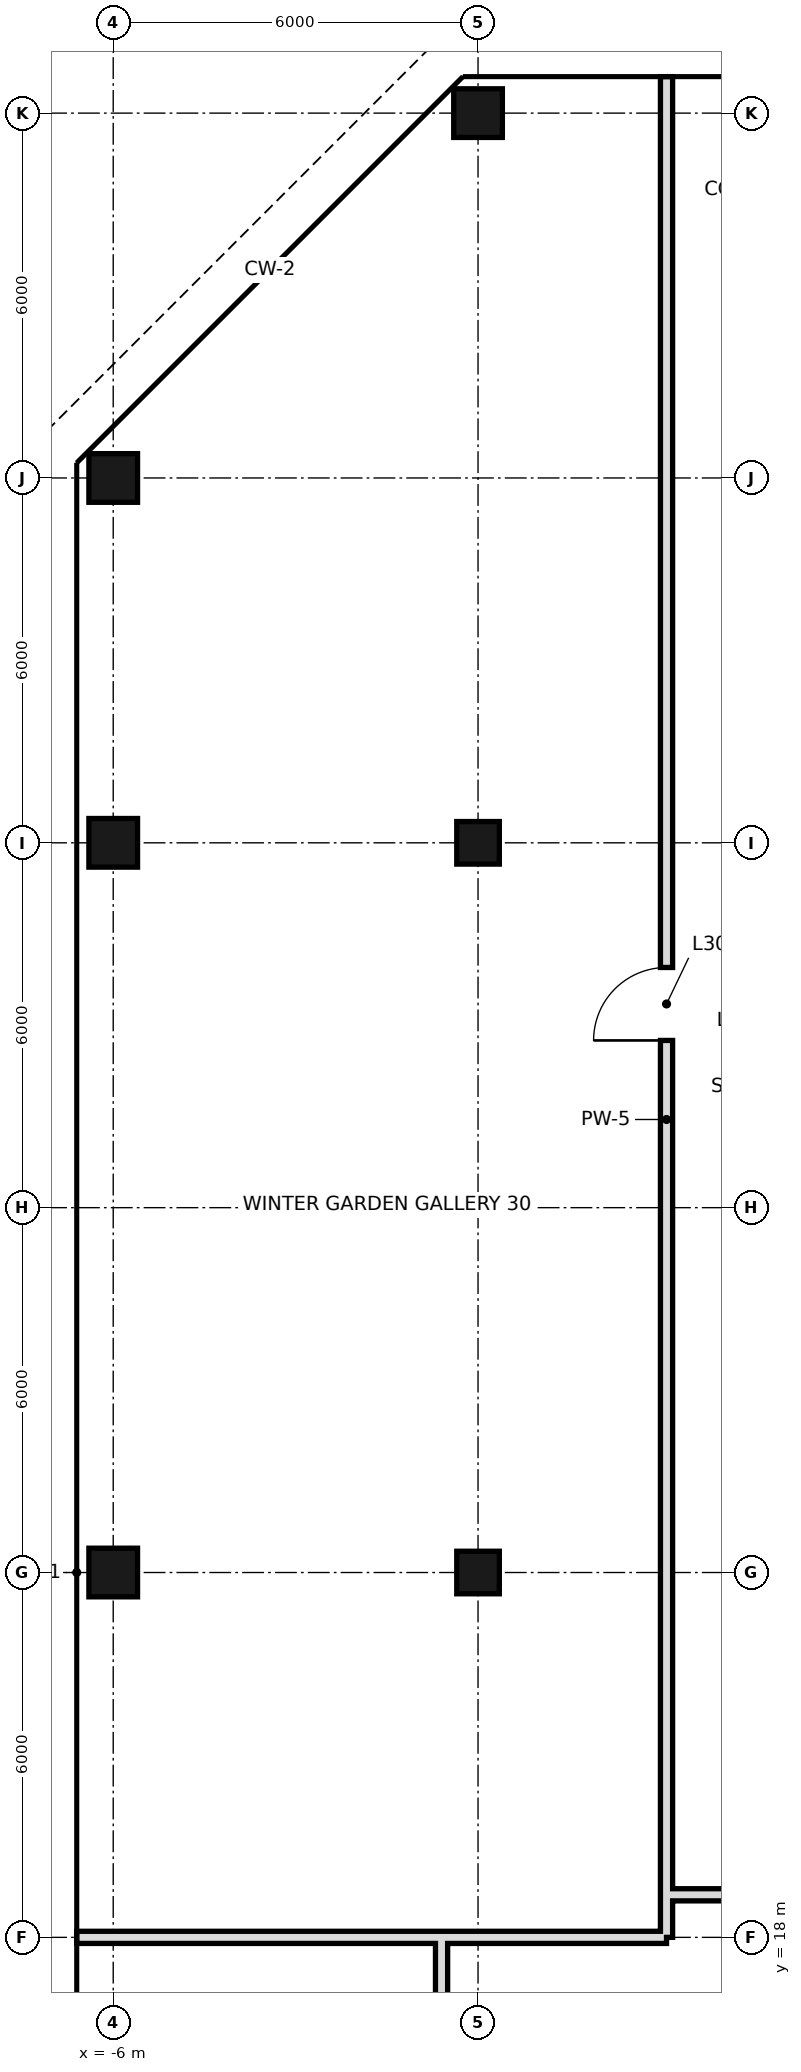
"""IFC4 building model, lengths in metres.
Left out: names, types, materials, properties, quantities, classifications, styles, units other than length and angle.
Written with IfcOpenShell. Run it as: python <this file> out.ifc"""

import sys

from ifc_helpers import new_model, si_unit, direction, frame, frame_2d, origin, origin_2d, place, context, subcontext, project, spatial, rectangle, hollow_rectangle, extrude, element, fill, save


model = new_model("IFC4")
c1 = context("Model", 3, precision=1e-05, world=origin(), true_north=direction((0.0, 1.0)))
c2 = subcontext(c1, "Body", "Model", "MODEL_VIEW")
j1 = project(units=[si_unit("LENGTHUNIT", "METRE"), si_unit("PLANEANGLEUNIT", "RADIAN")], contexts=[c1])
p1 = place(None, origin())
s1 = spatial("IfcSite", under=j1, at=p1, CompositionType="ELEMENT")
p2 = place(p1, origin())
s2 = spatial("IfcBuilding", under=s1, at=p2, CompositionType="ELEMENT")
p3 = place(p2, frame((0.0, 0.0, 134.0)))
s3 = spatial("IfcBuildingStorey", under=s2, at=p3, CompositionType="ELEMENT", Elevation=134.0)
for number, where, z_axis, x_axis in (
    (1, (-6.0, 24.0, 0.0), (0.0, 0.0, 1.0), (1.0, 0.0, 0.0)),
    (2, (-6.0, 36.0, 0.0), (0.0, 0.0, 1.0), (1.0, 0.0, 0.0)),
    (3, (-6.0, 42.0, 0.0), (0.0, 0.0, 1.0), (1.0, 0.0, 0.0)),
):
    element("IfcColumn", number, at=place(p3, frame(where, z_axis=z_axis, x_axis=x_axis)), inside=s3, PredefinedType="COLUMN", context=c2, shape_type="SweptSolid", body=[
        extrude(hollow_rectangle(XDim=0.8, YDim=0.8, WallThickness=0.04, at=origin_2d()), origin(), (0.0, 0.0, 1.0), 4.4),
    ])
for number, where, z_axis, x_axis in (
    (4, (0.0, 24.0, 0.0), (0.0, 0.0, 1.0), (1.0, 0.0, 0.0)),
    (5, (0.0, 36.0, 0.0), (0.0, 0.0, 1.0), (1.0, 0.0, 0.0)),
):
    element("IfcColumn", number, at=place(p3, frame(where, z_axis=z_axis, x_axis=x_axis)), inside=s3, PredefinedType="COLUMN", context=c2, shape_type="SweptSolid", body=[
        extrude(hollow_rectangle(XDim=0.7, YDim=0.7, WallThickness=0.036, at=origin_2d()), origin(), (0.0, 0.0, 1.0), 4.4),
    ])
p4 = place(p3, frame((0.0, 48.0, 0.0), z_axis=(0.0, 0.0, 1.0), x_axis=(1.0, 0.0, 0.0)))
e6 = element("IfcColumn", 6, at=p4, inside=s3, PredefinedType="COLUMN", context=c2, shape_type="SweptSolid", body=[
    extrude(hollow_rectangle(XDim=0.8, YDim=0.8, WallThickness=0.04, at=origin_2d()), origin(), (0.0, 0.0, 1.0), 4.4),
])
p5 = place(p3, frame((-0.6, 10.8, 0.0), z_axis=(0.0, 0.0, 1.0), x_axis=(0.0, 1.0, 0.0)))
e7 = element("IfcWall", 7, at=p5, inside=s3, PredefinedType="SOLIDWALL", context=c2, shape_type="SweptSolid", body=[
    extrude(rectangle(XDim=7.2, YDim=0.2, at=frame_2d((3.6, 0.0))), origin(), (0.0, 0.0, 1.0), 3.65),
])
p6 = place(p3, frame((3.1, 18.0, 0.0), z_axis=(0.0, 0.0, 1.0), x_axis=(0.0, 1.0, 0.0)))
e8 = element("IfcWall", 8, at=p6, inside=s3, PredefinedType="SOLIDWALL", context=c2, shape_type="SweptSolid", body=[
    extrude(rectangle(XDim=30.6, YDim=0.2, at=frame_2d((15.3, 0.0))), origin(), (0.0, 0.0, 1.0), 3.4),
])
p7 = place(p6, frame((14.75, 0.0, 0.0)))
e9 = element("IfcOpeningElement", 9, at=p7, cuts=e8, PredefinedType="OPENING", context=c2, shape_type="SweptSolid", body=[
    extrude(rectangle(XDim=1.2, YDim=2.4, at=frame_2d((0.6, 1.2))), frame((0.0, 0.11, 0.0), z_axis=(0.0, -1.0, 0.0), x_axis=(1.0, 0.0, 0.0)), (0.0, 0.0, 1.0), 0.22),
])
p8 = place(p3, frame((-0.6, 18.0, 0.0), z_axis=(0.0, 0.0, 1.0), x_axis=(1.0, 0.0, 0.0)))
e10 = element("IfcWall", 10, at=p8, inside=s3, PredefinedType="SOLIDWALL", context=c2, shape_type="SweptSolid", body=[
    extrude(rectangle(XDim=3.7, YDim=0.2, at=frame_2d((1.85, 0.0))), origin(), (0.0, 0.0, 1.0), 3.4),
])
p9 = place(p3, frame((-6.6, 18.0, 0.0), z_axis=(0.0, 0.0, 1.0), x_axis=(1.0, 0.0, 0.0)))
e11 = element("IfcWall", 11, at=p9, inside=s3, PredefinedType="SOLIDWALL", context=c2, shape_type="SweptSolid", body=[
    extrude(rectangle(XDim=6.0, YDim=0.2, at=frame_2d((3.0, 0.0))), origin(), (0.0, 0.0, 1.0), 3.4),
])
p10 = place(p3, frame((3.1, 18.7, 0.0), z_axis=(0.0, 0.0, 1.0), x_axis=(1.0, 0.0, 0.0)))
e12 = element("IfcWall", 12, at=p10, inside=s3, PredefinedType="SOLIDWALL", context=c2, shape_type="SweptSolid", body=[
    extrude(rectangle(XDim=41.8, YDim=0.2, at=frame_2d((20.9, 0.0))), origin(), (0.0, 0.0, 1.0), 3.4),
])
p11 = place(p10, frame((14.04, 0.0, 0.0)))
e13 = element("IfcOpeningElement", 13, at=p11, cuts=e12, PredefinedType="OPENING", context=c2, shape_type="SweptSolid", body=[
    extrude(rectangle(XDim=1.2, YDim=2.4, at=frame_2d((0.6, 1.2))), frame((0.0, 0.11, 0.0), z_axis=(0.0, -1.0, 0.0), x_axis=(1.0, 0.0, 0.0)), (0.0, 0.0, 1.0), 0.22),
])
p12 = place(p10, frame((26.73, 0.0, 0.0)))
e14 = element("IfcOpeningElement", 14, at=p12, cuts=e12, PredefinedType="OPENING", context=c2, shape_type="SweptSolid", body=[
    extrude(rectangle(XDim=1.8, YDim=2.4, at=frame_2d((0.9, 1.2))), frame((0.0, 0.11, 0.0), z_axis=(0.0, -1.0, 0.0), x_axis=(1.0, 0.0, 0.0)), (0.0, 0.0, 1.0), 0.22),
])
p13 = place(p7, origin())
e15 = element("IfcDoor", 15, at=p13, inside=s3, OperationType="SINGLE_SWING_LEFT", PredefinedType="DOOR", context=c2, shape_type="SweptSolid", body=[
    extrude(rectangle(XDim=1.2, YDim=2.4, at=frame_2d((0.6, 1.2))), frame((0.0, 0.025, 0.0), z_axis=(0.0, -1.0, 0.0), x_axis=(1.0, 0.0, 0.0)), (0.0, 0.0, 1.0), 0.05),
])
fill(e9, e15)
save(model, sys.argv[1])
